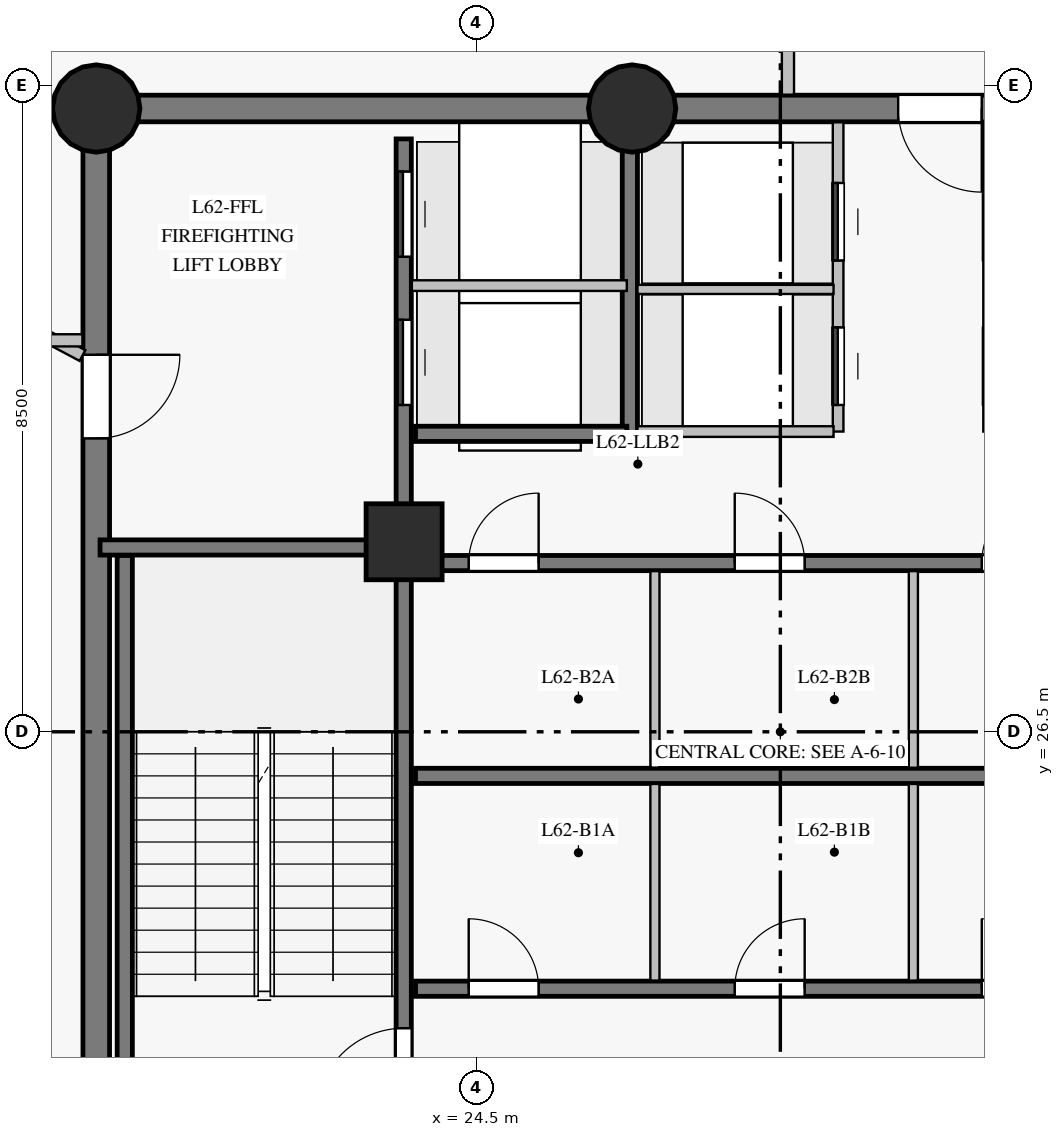
"""IFC4 building model, lengths in metres.
Left out: names, types, materials, properties, quantities, classifications, styles, units other than length and angle.
Written with IfcOpenShell. Run it as: python <this file> out.ifc"""

import sys

from ifc_helpers import new_model, si_unit, direction, frame, frame_2d, origin, origin_with_axes, origin_2d, place, context, subcontext, project, spatial, rectangle, circle, extrude, source, transform, mapped, element, fill, save


model = new_model("IFC4")
c1 = context("Model", 3, precision=1e-05, world=origin(), true_north=direction((0.0, 1.0)))
c2 = subcontext(c1, "Body", "Model", "MODEL_VIEW")
j1 = project(units=[si_unit("LENGTHUNIT", "METRE"), si_unit("PLANEANGLEUNIT", "RADIAN")], contexts=[c1])
p1 = place(None, origin())
s1 = spatial("IfcSite", under=j1, at=p1, CompositionType="ELEMENT")
p2 = place(p1, origin())
s2 = spatial("IfcBuilding", under=s1, at=p2, CompositionType="ELEMENT")
p3 = place(p2, frame((0.0, 0.0, 212.9)))
s3 = spatial("IfcBuildingStorey", under=s2, at=p3, CompositionType="ELEMENT", Elevation=212.9)
p4 = place(p3, frame((37.5, 34.7, 0.0), z_axis=(0.0, 0.0, 1.0), x_axis=(-1.0, 0.0, 0.0)))
e1 = element("IfcWall", 1, at=p4, inside=s3, PredefinedType="SHEAR", context=c2, shape_type="SweptSolid", body=[
    extrude(rectangle(XDim=10.95, YDim=0.35, at=frame_2d((5.475, 0.0))), origin(), (0.0, 0.0, 1.0), 3.8),
])
p5 = place(p4, frame((2.15, 0.0, 0.0)))
e2 = element("IfcOpeningElement", 2, at=p5, cuts=e1, PredefinedType="OPENING", context=c2, shape_type="SweptSolid", body=[
    extrude(rectangle(XDim=1.2, YDim=2.15, at=frame_2d((0.6, 1.075))), frame((0.0, 0.185, 0.0), z_axis=(0.0, -1.0, 0.0), x_axis=(1.0, 0.0, 0.0)), (0.0, 0.0, 1.0), 0.37),
])
p6 = place(p4, frame((6.35, 0.0, 0.0)))
e3 = element("IfcOpeningElement", 3, at=p6, cuts=e1, PredefinedType="OPENING", context=c2, shape_type="SweptSolid", body=[
    extrude(rectangle(XDim=1.1, YDim=2.15, at=frame_2d((0.55, 1.075))), frame((0.0, 0.185, 0.0), z_axis=(0.0, -1.0, 0.0), x_axis=(1.0, 0.0, 0.0)), (0.0, 0.0, 1.0), 0.37),
])
p7 = place(p3, frame((26.55, 34.7, 0.0), z_axis=(0.0, 0.0, 1.0), x_axis=(-1.0, 0.0, 0.0)))
e4 = element("IfcWall", 4, at=p7, inside=s3, PredefinedType="SHEAR", context=c2, shape_type="SweptSolid", body=[
    extrude(rectangle(XDim=7.05, YDim=0.35, at=frame_2d((3.525, 0.0))), origin(), (0.0, 0.0, 1.0), 3.8),
])
p8 = place(p3, frame((19.5, 34.7, 0.0), z_axis=(0.0, 0.0, 1.0), x_axis=(0.0, -1.0, 0.0)))
e5 = element("IfcWall", 5, at=p8, inside=s3, PredefinedType="SHEAR", context=c2, shape_type="SweptSolid", body=[
    extrude(rectangle(XDim=16.4, YDim=0.35, at=frame_2d((8.2, 0.0))), origin(), (0.0, 0.0, 1.0), 3.8),
])
p9 = place(p8, frame((3.24, 0.0, 0.0)))
e6 = element("IfcOpeningElement", 6, at=p9, cuts=e5, PredefinedType="OPENING", context=c2, shape_type="SweptSolid", body=[
    extrude(rectangle(XDim=1.1, YDim=2.15, at=frame_2d((0.55, 1.075))), frame((0.0, 0.185, 0.0), z_axis=(0.0, -1.0, 0.0), x_axis=(1.0, 0.0, 0.0)), (0.0, 0.0, 1.0), 0.37),
])
m1 = source(origin_with_axes(), c2, "Body", "SweptSolid", [
    extrude(circle(Radius=0.575, at=origin_2d()), origin(), (0.0, 0.0, 1.0), 4.0),
])
for number, where, z_axis, x_axis in (
    (7, (19.5, 34.7, 0.0), (0.0, 0.0, 1.0), (1.0, 0.0, 0.0)),
    (8, (26.55, 34.7, 0.0), (0.0, 0.0, 1.0), (1.0, 0.0, 0.0)),
):
    element("IfcColumn", number, at=place(p3, frame(where, z_axis=z_axis, x_axis=x_axis)), inside=s3, PredefinedType="COLUMN", context=c2, shape_type="MappedRepresentation", body=[
        mapped(m1, transform((0.0, 0.0, 0.0), scale=1.0)),
    ])
m2 = source(origin_with_axes(), c2, "Body", "SweptSolid", [
    extrude(rectangle(XDim=1.0, YDim=1.0, at=origin_2d()), origin(), (0.0, 0.0, 1.0), 4.0),
])
p10 = place(p3, frame((23.55, 29.0, 0.0), z_axis=(0.0, 0.0, 1.0), x_axis=(1.0, 0.0, 0.0)))
e9 = element("IfcColumn", 9, at=p10, inside=s3, PredefinedType="COLUMN", context=c2, shape_type="MappedRepresentation", body=[
    mapped(m2, transform((0.0, 0.0, 0.0), scale=1.0)),
])
p11 = place(p3, frame((23.545, 18.7, 0.0), z_axis=(0.0, 0.0, 1.0), x_axis=(0.0, 1.0, 0.0)))
e10 = element("IfcWall", 10, at=p11, inside=s3, PredefinedType="SHEAR", context=c2, shape_type="SweptSolid", body=[
    extrude(rectangle(XDim=15.6, YDim=0.2, at=frame_2d((7.8, 0.0))), origin(), (0.0, 0.0, 1.0), 3.8),
])
p12 = place(p11, frame((2.75, 0.0, 0.0)))
e11 = element("IfcOpeningElement", 11, at=p12, cuts=e10, PredefinedType="OPENING", context=c2, shape_type="SweptSolid", body=[
    extrude(rectangle(XDim=1.15, YDim=2.15, at=frame_2d((0.575, 1.075))), frame((0.0, 0.11, 0.0), z_axis=(0.0, -1.0, 0.0), x_axis=(1.0, 0.0, 0.0)), (0.0, 0.0, 1.0), 0.22),
])
p13 = place(p11, frame((0.14, 0.0, 0.0)))
e12 = element("IfcOpeningElement", 12, at=p13, cuts=e10, PredefinedType="OPENING", context=c2, shape_type="SweptSolid", body=[
    extrude(rectangle(XDim=0.88, YDim=2.1, at=frame_2d((0.44, 1.05))), frame((0.0, 0.11, 0.0), z_axis=(0.0, -1.0, 0.0), x_axis=(1.0, 0.0, 0.0)), (0.0, 0.0, 1.0), 0.22),
])
p14 = place(p11, frame((1.36, 0.0, 0.0)))
e13 = element("IfcOpeningElement", 13, at=p14, cuts=e10, PredefinedType="OPENING", context=c2, shape_type="SweptSolid", body=[
    extrude(rectangle(XDim=0.88, YDim=2.1, at=frame_2d((0.44, 1.05))), frame((0.0, 0.11, 0.0), z_axis=(0.0, -1.0, 0.0), x_axis=(1.0, 0.0, 0.0)), (0.0, 0.0, 1.0), 0.22),
])
p15 = place(p11, frame((12.1, 0.0, 0.0)))
e14 = element("IfcOpeningElement", 14, at=p15, cuts=e10, PredefinedType="OPENING", context=c2, shape_type="SweptSolid", body=[
    extrude(rectangle(XDim=1.12, YDim=2.15, at=frame_2d((0.56, 1.075))), frame((0.0, 0.11, 0.0), z_axis=(0.0, -1.0, 0.0), x_axis=(1.0, 0.0, 0.0)), (0.0, 0.0, 1.0), 0.22),
])
p16 = place(p11, frame((14.05, 0.0, 0.0)))
e15 = element("IfcOpeningElement", 15, at=p16, cuts=e10, PredefinedType="OPENING", context=c2, shape_type="SweptSolid", body=[
    extrude(rectangle(XDim=1.12, YDim=2.15, at=frame_2d((0.56, 1.075))), frame((0.0, 0.11, 0.0), z_axis=(0.0, -1.0, 0.0), x_axis=(1.0, 0.0, 0.0)), (0.0, 0.0, 1.0), 0.22),
])
p17 = place(p3, frame((23.7, 23.12, 0.0), z_axis=(0.0, 0.0, 1.0), x_axis=(1.0, 0.0, 0.0)))
e16 = element("IfcWall", 16, at=p17, inside=s3, PredefinedType="SHEAR", context=c2, shape_type="SweptSolid", body=[
    extrude(rectangle(XDim=9.6, YDim=0.2, at=frame_2d((4.8, 0.0))), origin(), (0.0, 0.0, 1.0), 3.8),
])
p18 = place(p17, frame((0.7, 0.0, 0.0)))
e17 = element("IfcOpeningElement", 17, at=p18, cuts=e16, PredefinedType="OPENING", context=c2, shape_type="SweptSolid", body=[
    extrude(rectangle(XDim=0.92, YDim=2.1, at=frame_2d((0.46, 1.05))), frame((0.0, 0.11, 0.0), z_axis=(0.0, -1.0, 0.0), x_axis=(1.0, 0.0, 0.0)), (0.0, 0.0, 1.0), 0.22),
])
p19 = place(p17, frame((4.2, 0.0, 0.0)))
e18 = element("IfcOpeningElement", 18, at=p19, cuts=e16, PredefinedType="OPENING", context=c2, shape_type="SweptSolid", body=[
    extrude(rectangle(XDim=0.92, YDim=2.1, at=frame_2d((0.46, 1.05))), frame((0.0, 0.11, 0.0), z_axis=(0.0, -1.0, 0.0), x_axis=(1.0, 0.0, 0.0)), (0.0, 0.0, 1.0), 0.22),
])
p20 = place(p17, frame((7.45, 0.0, 0.0)))
e19 = element("IfcOpeningElement", 19, at=p20, cuts=e16, PredefinedType="OPENING", context=c2, shape_type="SweptSolid", body=[
    extrude(rectangle(XDim=0.92, YDim=2.1, at=frame_2d((0.46, 1.05))), frame((0.0, 0.11, 0.0), z_axis=(0.0, -1.0, 0.0), x_axis=(1.0, 0.0, 0.0)), (0.0, 0.0, 1.0), 0.22),
])
p21 = place(p3, frame((23.7, 25.92, 0.0), z_axis=(0.0, 0.0, 1.0), x_axis=(1.0, 0.0, 0.0)))
e20 = element("IfcWall", 20, at=p21, inside=s3, PredefinedType="SHEAR", context=c2, shape_type="SweptSolid", body=[
    extrude(rectangle(XDim=9.6, YDim=0.2, at=frame_2d((4.8, 0.0))), origin(), (0.0, 0.0, 1.0), 3.8),
])
p22 = place(p3, frame((23.7, 28.72, 0.0), z_axis=(0.0, 0.0, 1.0), x_axis=(1.0, 0.0, 0.0)))
e21 = element("IfcWall", 21, at=p22, inside=s3, PredefinedType="SHEAR", context=c2, shape_type="SweptSolid", body=[
    extrude(rectangle(XDim=9.6, YDim=0.2, at=frame_2d((4.8, 0.0))), origin(), (0.0, 0.0, 1.0), 3.8),
])
p23 = place(p22, frame((0.7, 0.0, 0.0)))
e22 = element("IfcOpeningElement", 22, at=p23, cuts=e21, PredefinedType="OPENING", context=c2, shape_type="SweptSolid", body=[
    extrude(rectangle(XDim=0.92, YDim=2.1, at=frame_2d((0.46, 1.05))), frame((0.0, 0.11, 0.0), z_axis=(0.0, -1.0, 0.0), x_axis=(1.0, 0.0, 0.0)), (0.0, 0.0, 1.0), 0.22),
])
p24 = place(p22, frame((4.2, 0.0, 0.0)))
e23 = element("IfcOpeningElement", 23, at=p24, cuts=e21, PredefinedType="OPENING", context=c2, shape_type="SweptSolid", body=[
    extrude(rectangle(XDim=0.92, YDim=2.1, at=frame_2d((0.46, 1.05))), frame((0.0, 0.11, 0.0), z_axis=(0.0, -1.0, 0.0), x_axis=(1.0, 0.0, 0.0)), (0.0, 0.0, 1.0), 0.22),
])
p25 = place(p22, frame((7.45, 0.0, 0.0)))
e24 = element("IfcOpeningElement", 24, at=p25, cuts=e21, PredefinedType="OPENING", context=c2, shape_type="SweptSolid", body=[
    extrude(rectangle(XDim=0.92, YDim=2.1, at=frame_2d((0.46, 1.05))), frame((0.0, 0.11, 0.0), z_axis=(0.0, -1.0, 0.0), x_axis=(1.0, 0.0, 0.0)), (0.0, 0.0, 1.0), 0.22),
])
p26 = place(p3, frame((19.875, 21.32, 0.0), z_axis=(0.0, 0.0, 1.0), x_axis=(0.0, 1.0, 0.0)))
e25 = element("IfcWall", 25, at=p26, inside=s3, PredefinedType="SHEAR", context=c2, shape_type="SweptSolid", body=[
    extrude(rectangle(XDim=7.5, YDim=0.2, at=frame_2d((3.75, 0.0))), origin(), (0.0, 0.0, 1.0), 3.8),
])
p27 = place(p3, frame((19.55, 28.925, 0.0), z_axis=(0.0, 0.0, 1.0), x_axis=(1.0, 0.0, 0.0)))
e26 = element("IfcWall", 26, at=p27, inside=s3, PredefinedType="SHEAR", context=c2, shape_type="SweptSolid", body=[
    extrude(rectangle(XDim=3.995, YDim=0.2, at=frame_2d((1.998, 0.0))), origin(), (0.0, 0.0, 1.0), 3.8),
])
p28 = place(p3, frame((26.52, 30.42, 0.0), z_axis=(0.0, 0.0, 1.0), x_axis=(0.0, 1.0, 0.0)))
e27 = element("IfcWall", 27, at=p28, inside=s3, PredefinedType="SHEAR", context=c2, shape_type="SweptSolid", body=[
    extrude(rectangle(XDim=3.86, YDim=0.2, at=frame_2d((1.93, 0.0))), origin(), (0.0, 0.0, 1.0), 3.8),
])
p29 = place(p3, frame((23.7, 30.42, 0.0), z_axis=(0.0, 0.0, 1.0), x_axis=(1.0, 0.0, 0.0)))
e28 = element("IfcWall", 28, at=p29, inside=s3, PredefinedType="SHEAR", context=c2, shape_type="SweptSolid", body=[
    extrude(rectangle(XDim=2.78, YDim=0.2, at=frame_2d((1.39, 0.0))), origin(), (0.0, 0.0, 1.0), 3.8),
])
p30 = place(p3, frame((19.319, 31.45, 0.0), z_axis=(0.0, 0.0, 1.0), x_axis=(-0.882941459701, 0.469483097397, 0.0)))
e29 = element("IfcWall", 29, at=p30, inside=s3, PredefinedType="PARTITIONING", context=c2, shape_type="SweptSolid", body=[
    extrude(rectangle(XDim=10.507, YDim=0.16, at=frame_2d((5.253, 0.0))), origin(), (0.0, 0.0, 1.0), 3.8),
])
p31 = place(p3, frame((29.26, 30.45, 0.0), z_axis=(0.0, 0.0, 1.0), x_axis=(0.0, 1.0, 0.0)))
e30 = element("IfcWall", 30, at=p31, inside=s3, PredefinedType="PARTITIONING", context=c2, shape_type="SweptSolid", body=[
    extrude(rectangle(XDim=4.068, YDim=0.14, at=frame_2d((2.034, 0.0))), origin(), (0.0, 0.0, 1.0), 3.8),
])
p32 = place(p31, frame((0.35, 0.0, 0.0)))
e31 = element("IfcOpeningElement", 31, at=p32, cuts=e30, PredefinedType="OPENING", context=c2, shape_type="SweptSolid", body=[
    extrude(rectangle(XDim=1.02, YDim=2.15, at=frame_2d((0.51, 1.075))), frame((0.0, 0.08, 0.0), z_axis=(0.0, -1.0, 0.0), x_axis=(1.0, 0.0, 0.0)), (0.0, 0.0, 1.0), 0.16),
])
p33 = place(p31, frame((2.25, 0.0, 0.0)))
e32 = element("IfcOpeningElement", 32, at=p33, cuts=e30, PredefinedType="OPENING", context=c2, shape_type="SweptSolid", body=[
    extrude(rectangle(XDim=1.02, YDim=2.15, at=frame_2d((0.51, 1.075))), frame((0.0, 0.08, 0.0), z_axis=(0.0, -1.0, 0.0), x_axis=(1.0, 0.0, 0.0)), (0.0, 0.0, 1.0), 0.16),
])
p34 = place(p3, frame((31.24, 30.45, 0.0), z_axis=(0.0, 0.0, 1.0), x_axis=(0.0, 1.0, 0.0)))
e33 = element("IfcWall", 33, at=p34, inside=s3, PredefinedType="PARTITIONING", context=c2, shape_type="SweptSolid", body=[
    extrude(rectangle(XDim=4.068, YDim=0.14, at=frame_2d((2.034, 0.0))), origin(), (0.0, 0.0, 1.0), 3.8),
])
p35 = place(p34, frame((0.35, 0.0, 0.0)))
e34 = element("IfcOpeningElement", 34, at=p35, cuts=e33, PredefinedType="OPENING", context=c2, shape_type="SweptSolid", body=[
    extrude(rectangle(XDim=1.02, YDim=2.15, at=frame_2d((0.51, 1.075))), frame((0.0, 0.08, 0.0), z_axis=(0.0, -1.0, 0.0), x_axis=(1.0, 0.0, 0.0)), (0.0, 0.0, 1.0), 0.16),
])
p36 = place(p34, frame((2.25, 0.0, 0.0)))
e35 = element("IfcOpeningElement", 35, at=p36, cuts=e33, PredefinedType="OPENING", context=c2, shape_type="SweptSolid", body=[
    extrude(rectangle(XDim=1.02, YDim=2.15, at=frame_2d((0.51, 1.075))), frame((0.0, 0.08, 0.0), z_axis=(0.0, -1.0, 0.0), x_axis=(1.0, 0.0, 0.0)), (0.0, 0.0, 1.0), 0.16),
])
p37 = place(p3, frame((23.652, 32.37, 0.0), z_axis=(0.0, 0.0, 1.0), x_axis=(1.0, 0.0, 0.0)))
e36 = element("IfcWall", 36, at=p37, inside=s3, PredefinedType="PARTITIONING", context=c2, shape_type="SweptSolid", body=[
    extrude(rectangle(XDim=2.828, YDim=0.14, at=frame_2d((1.414, 0.0))), origin(), (0.0, 0.0, 1.0), 3.8),
])
p38 = place(p3, frame((26.62, 30.45, 0.0), z_axis=(0.0, 0.0, 1.0), x_axis=(1.0, 0.0, 0.0)))
e37 = element("IfcWall", 37, at=p38, inside=s3, PredefinedType="PARTITIONING", context=c2, shape_type="SweptSolid", body=[
    extrude(rectangle(XDim=2.58, YDim=0.14, at=frame_2d((1.29, 0.0))), origin(), (0.0, 0.0, 1.0), 3.8),
])
p39 = place(p3, frame((26.62, 32.32, 0.0), z_axis=(0.0, 0.0, 1.0), x_axis=(1.0, 0.0, 0.0)))
e38 = element("IfcWall", 38, at=p39, inside=s3, PredefinedType="PARTITIONING", context=c2, shape_type="SweptSolid", body=[
    extrude(rectangle(XDim=2.58, YDim=0.12, at=frame_2d((1.29, 0.0))), origin(), (0.0, 0.0, 1.0), 3.8),
])
p40 = place(p3, frame((16.75, 31.65, 0.0), z_axis=(0.0, 0.0, 1.0), x_axis=(1.0, 0.0, 0.0)))
e39 = element("IfcWall", 39, at=p40, inside=s3, PredefinedType="PARTITIONING", context=c2, shape_type="SweptSolid", body=[
    extrude(rectangle(XDim=2.568, YDim=0.16, at=frame_2d((1.284, 0.0))), origin(), (0.0, 0.0, 1.0), 3.8),
])
for number, where, z_axis, x_axis in (
    (40, (26.85, 23.227, 0.0), (0.0, 0.0, 1.0), (0.0, 1.0, 0.0)),
    (41, (30.25, 23.227, 0.0), (0.0, 0.0, 1.0), (0.0, 1.0, 0.0)),
    (42, (26.85, 26.027, 0.0), (0.0, 0.0, 1.0), (0.0, 1.0, 0.0)),
    (43, (30.25, 26.027, 0.0), (0.0, 0.0, 1.0), (0.0, 1.0, 0.0)),
):
    element("IfcWall", number, at=place(p3, frame(where, z_axis=z_axis, x_axis=x_axis)), inside=s3, PredefinedType="PARTITIONING", context=c2, shape_type="SweptSolid", body=[
        extrude(rectangle(XDim=2.587, YDim=0.12, at=frame_2d((1.293, 0.0))), origin(), (0.0, 0.0, 1.0), 3.8),
    ])
p41 = place(p3, frame((28.6, 34.882, 0.0), z_axis=(0.0, 0.0, 1.0), x_axis=(0.0, 1.0, 0.0)))
e44 = element("IfcWall", 44, at=p41, inside=s3, PredefinedType="PARTITIONING", context=c2, shape_type="SweptSolid", body=[
    extrude(rectangle(XDim=1.518, YDim=0.16, at=frame_2d((0.759, 0.0))), origin(), (0.0, 0.0, 1.0), 3.8),
])
m3 = source(origin_with_axes(), c2, "Body", "SweptSolid", [
    extrude(rectangle(XDim=1.15, YDim=2.15, at=frame_2d((0.575, 1.075))), frame((0.0, 0.025, 0.0), z_axis=(0.0, -1.0, 0.0), x_axis=(1.0, 0.0, 0.0)), (0.0, 0.0, 1.0), 0.05),
])
p42 = place(p12, origin())
e45 = element("IfcDoor", 45, at=p42, inside=s3, OperationType="SINGLE_SWING_LEFT", PredefinedType="DOOR", context=c2, shape_type="MappedRepresentation", body=[
    mapped(m3, transform((0.0, 0.0, 0.0), scale=1.0)),
])
fill(e11, e45)
m4 = source(origin_with_axes(), c2, "Body", "SweptSolid", [
    extrude(rectangle(XDim=1.1, YDim=2.15, at=frame_2d((0.55, 1.075))), frame((0.0, 0.025, 0.0), z_axis=(0.0, -1.0, 0.0), x_axis=(1.0, 0.0, 0.0)), (0.0, 0.0, 1.0), 0.05),
])
p43 = place(p9, origin())
e46 = element("IfcDoor", 46, at=p43, inside=s3, OperationType="SINGLE_SWING_LEFT", PredefinedType="DOOR", context=c2, shape_type="MappedRepresentation", body=[
    mapped(m4, transform((0.0, 0.0, 0.0), scale=1.0)),
])
fill(e6, e46)
m5 = source(origin_with_axes(), c2, "Body", "SweptSolid", [
    extrude(rectangle(XDim=0.92, YDim=2.1, at=frame_2d((0.46, 1.05))), frame((0.0, 0.025, 0.0), z_axis=(0.0, -1.0, 0.0), x_axis=(1.0, 0.0, 0.0)), (0.0, 0.0, 1.0), 0.05),
])
p44 = place(p18, origin())
e47 = element("IfcDoor", 47, at=p44, inside=s3, OperationType="SINGLE_SWING_LEFT", PredefinedType="DOOR", context=c2, shape_type="MappedRepresentation", body=[
    mapped(m5, transform((0.0, 0.0, 0.0), scale=1.0)),
])
fill(e17, e47)
p45 = place(p19, origin())
e48 = element("IfcDoor", 48, at=p45, inside=s3, OperationType="SINGLE_SWING_RIGHT", PredefinedType="DOOR", context=c2, shape_type="MappedRepresentation", body=[
    mapped(m5, transform((0.0, 0.0, 0.0), scale=1.0)),
])
fill(e18, e48)
p46 = place(p20, origin())
e49 = element("IfcDoor", 49, at=p46, inside=s3, OperationType="SINGLE_SWING_LEFT", PredefinedType="DOOR", context=c2, shape_type="MappedRepresentation", body=[
    mapped(m5, transform((0.0, 0.0, 0.0), scale=1.0)),
])
fill(e19, e49)
p47 = place(p23, origin())
e50 = element("IfcDoor", 50, at=p47, inside=s3, OperationType="SINGLE_SWING_RIGHT", PredefinedType="DOOR", context=c2, shape_type="MappedRepresentation", body=[
    mapped(m5, transform((0.0, 0.0, 0.0), scale=1.0)),
])
fill(e22, e50)
p48 = place(p24, origin())
e51 = element("IfcDoor", 51, at=p48, inside=s3, OperationType="SINGLE_SWING_LEFT", PredefinedType="DOOR", context=c2, shape_type="MappedRepresentation", body=[
    mapped(m5, transform((0.0, 0.0, 0.0), scale=1.0)),
])
fill(e23, e51)
p49 = place(p25, origin())
e52 = element("IfcDoor", 52, at=p49, inside=s3, OperationType="SINGLE_SWING_RIGHT", PredefinedType="DOOR", context=c2, shape_type="MappedRepresentation", body=[
    mapped(m5, transform((0.0, 0.0, 0.0), scale=1.0)),
])
fill(e24, e52)
p50 = place(p6, origin())
e53 = element("IfcDoor", 53, at=p50, inside=s3, OperationType="SINGLE_SWING_LEFT", PredefinedType="DOOR", context=c2, shape_type="MappedRepresentation", body=[
    mapped(m4, transform((0.0, 0.0, 0.0), scale=1.0)),
])
fill(e3, e53)
m6 = source(origin_with_axes(), c2, "Body", "SweptSolid", [
    extrude(rectangle(XDim=1.12, YDim=2.15, at=frame_2d((0.56, 1.075))), frame((0.0, 0.025, 0.0), z_axis=(0.0, -1.0, 0.0), x_axis=(1.0, 0.0, 0.0)), (0.0, 0.0, 1.0), 0.05),
])
p51 = place(p15, origin())
e54 = element("IfcDoor", 54, at=p51, inside=s3, OperationType="SLIDING_TO_LEFT", PredefinedType="DOOR", context=c2, shape_type="MappedRepresentation", body=[
    mapped(m6, transform((0.0, 0.0, 0.0), scale=1.0)),
])
fill(e14, e54)
p52 = place(p16, origin())
e55 = element("IfcDoor", 55, at=p52, inside=s3, OperationType="SLIDING_TO_RIGHT", PredefinedType="DOOR", context=c2, shape_type="MappedRepresentation", body=[
    mapped(m6, transform((0.0, 0.0, 0.0), scale=1.0)),
])
fill(e15, e55)
m7 = source(origin_with_axes(), c2, "Body", "SweptSolid", [
    extrude(rectangle(XDim=1.02, YDim=2.15, at=frame_2d((0.51, 1.075))), frame((0.0, 0.025, 0.0), z_axis=(0.0, -1.0, 0.0), x_axis=(1.0, 0.0, 0.0)), (0.0, 0.0, 1.0), 0.05),
])
p53 = place(p32, origin())
e56 = element("IfcDoor", 56, at=p53, inside=s3, OperationType="SLIDING_TO_LEFT", PredefinedType="DOOR", context=c2, shape_type="MappedRepresentation", body=[
    mapped(m7, transform((0.0, 0.0, 0.0), scale=1.0)),
])
fill(e31, e56)
p54 = place(p33, origin())
e57 = element("IfcDoor", 57, at=p54, inside=s3, OperationType="SLIDING_TO_LEFT", PredefinedType="DOOR", context=c2, shape_type="MappedRepresentation", body=[
    mapped(m7, transform((0.0, 0.0, 0.0), scale=1.0)),
])
fill(e32, e57)
save(model, sys.argv[1])
